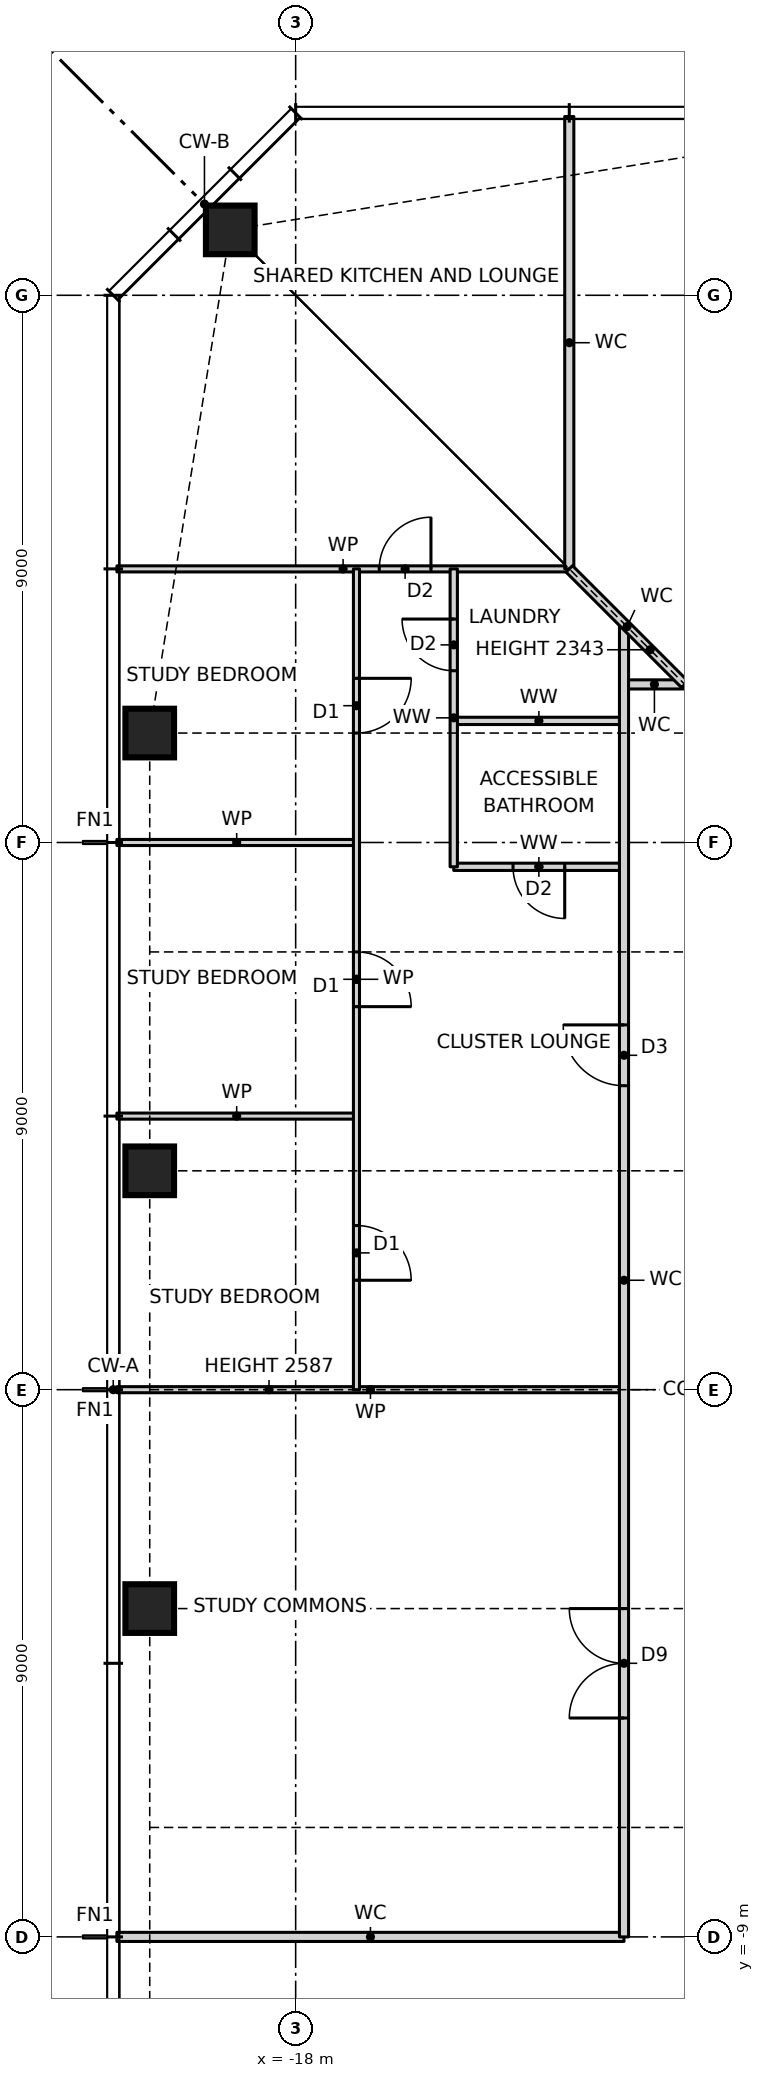
"""IFC4 building model, lengths in metres.
Left out: names, types, materials, properties, quantities, classifications, styles, units other than length and angle.
Written with IfcOpenShell. Run it as: python <this file> out.ifc"""

import sys

from ifc_helpers import new_model, si_unit, direction, frame, frame_2d, origin, origin_2d, place, context, subcontext, project, spatial, rectangle, hollow_rectangle, extrude, element, fill, save


model = new_model("IFC4")
c1 = context("Model", 3, precision=1e-05, world=origin(), true_north=direction((0.0, 1.0)))
c2 = subcontext(c1, "Body", "Model", "MODEL_VIEW")
j1 = project(units=[si_unit("LENGTHUNIT", "METRE"), si_unit("PLANEANGLEUNIT", "RADIAN")], contexts=[c1])
p1 = place(None, origin())
s1 = spatial("IfcSite", under=j1, at=p1, CompositionType="ELEMENT")
p2 = place(p1, origin())
s2 = spatial("IfcBuilding", under=s1, at=p2, CompositionType="ELEMENT")
p3 = place(p2, frame((0.0, 0.0, 126.0)))
s3 = spatial("IfcBuildingStorey", under=s2, at=p3, CompositionType="ELEMENT", Elevation=126.0)
for number, where, z_axis, x_axis in (
    (1, (-19.076, 19.076, 0.0), (0.0, 0.0, 1.0), (1.0, 0.0, 0.0)),
    (2, (-20.4, 10.8, 0.0), (0.0, 0.0, 1.0), (1.0, 0.0, 0.0)),
    (3, (-20.4, 3.6, 0.0), (0.0, 0.0, 1.0), (1.0, 0.0, 0.0)),
    (4, (-20.4, -3.6, 0.0), (0.0, 0.0, 1.0), (1.0, 0.0, 0.0)),
):
    element("IfcColumn", number, at=place(p3, frame(where, z_axis=z_axis, x_axis=x_axis)), inside=s3, PredefinedType="COLUMN", context=c2, shape_type="SweptSolid", body=[
        extrude(hollow_rectangle(XDim=0.8, YDim=0.8, WallThickness=0.07, at=origin_2d()), origin(), (0.0, 0.0, 1.0), 3.5),
    ])
p4 = place(p3, frame((-20.94, -9.0, 0.0), z_axis=(0.0, 0.0, 1.0), x_axis=(1.0, 0.0, 0.0)))
e5 = element("IfcWall", 5, at=p4, inside=s3, PredefinedType="PARTITIONING", context=c2, shape_type="SweptSolid", body=[
    extrude(rectangle(XDim=8.34, YDim=0.15, at=frame_2d((4.17, 0.0))), origin(), (0.0, 0.0, 1.0), 3.27),
])
p5 = place(p3, frame((-20.94, 0.0, 0.0), z_axis=(0.0, 0.0, 1.0), x_axis=(1.0, 0.0, 0.0)))
e6 = element("IfcWall", 6, at=p5, inside=s3, PredefinedType="PARTITIONING", context=c2, shape_type="SweptSolid", body=[
    extrude(rectangle(XDim=8.34, YDim=0.1, at=frame_2d((4.17, 0.0))), origin(), (0.0, 0.0, 1.0), 2.587),
])
p6 = place(p3, frame((-20.94, 4.5, 0.0), z_axis=(0.0, 0.0, 1.0), x_axis=(1.0, 0.0, 0.0)))
e7 = element("IfcWall", 7, at=p6, inside=s3, PredefinedType="PARTITIONING", context=c2, shape_type="SweptSolid", body=[
    extrude(rectangle(XDim=3.94, YDim=0.1, at=frame_2d((1.97, 0.0))), origin(), (0.0, 0.0, 1.0), 3.27),
])
p7 = place(p3, frame((-15.4, 8.6, 0.0), z_axis=(0.0, 0.0, 1.0), x_axis=(1.0, 0.0, 0.0)))
e8 = element("IfcWall", 8, at=p7, inside=s3, PredefinedType="PARTITIONING", context=c2, shape_type="SweptSolid", body=[
    extrude(rectangle(XDim=2.8, YDim=0.12, at=frame_2d((1.4, 0.0))), origin(), (0.0, 0.0, 1.0), 3.27),
])
p8 = place(p7, frame((0.975, 0.0, 0.0)))
e9 = element("IfcOpeningElement", 9, at=p8, cuts=e8, PredefinedType="OPENING", context=c2, shape_type="SweptSolid", body=[
    extrude(rectangle(XDim=0.85, YDim=2.1, at=frame_2d((0.425, 1.05))), frame((0.0, 0.07, 0.0), z_axis=(0.0, -1.0, 0.0), x_axis=(1.0, 0.0, 0.0)), (0.0, 0.0, 1.0), 0.14),
])
p9 = place(p3, frame((-20.94, 9.0, 0.0), z_axis=(0.0, 0.0, 1.0), x_axis=(1.0, 0.0, 0.0)))
e10 = element("IfcWall", 10, at=p9, inside=s3, PredefinedType="PARTITIONING", context=c2, shape_type="SweptSolid", body=[
    extrude(rectangle(XDim=3.94, YDim=0.1, at=frame_2d((1.97, 0.0))), origin(), (0.0, 0.0, 1.0), 3.27),
])
p10 = place(p3, frame((-15.4, 11.0, 0.0), z_axis=(0.0, 0.0, 1.0), x_axis=(1.0, 0.0, 0.0)))
e11 = element("IfcWall", 11, at=p10, inside=s3, PredefinedType="PARTITIONING", context=c2, shape_type="SweptSolid", body=[
    extrude(rectangle(XDim=2.8, YDim=0.12, at=frame_2d((1.4, 0.0))), origin(), (0.0, 0.0, 1.0), 3.27),
])
p11 = place(p3, frame((-12.6, 11.6, 0.0), z_axis=(0.0, 0.0, 1.0), x_axis=(1.0, 0.0, 0.0)))
e12 = element("IfcWall", 12, at=p11, inside=s3, PredefinedType="PARTITIONING", context=c2, shape_type="SweptSolid", body=[
    extrude(rectangle(XDim=1.0, YDim=0.15, at=frame_2d((0.5, 0.0))), origin(), (0.0, 0.0, 1.0), 3.27),
])
p12 = place(p3, frame((-20.94, 13.5, 0.0), z_axis=(0.0, 0.0, 1.0), x_axis=(1.0, 0.0, 0.0)))
e13 = element("IfcWall", 13, at=p12, inside=s3, PredefinedType="PARTITIONING", context=c2, shape_type="SweptSolid", body=[
    extrude(rectangle(XDim=7.44, YDim=0.1, at=frame_2d((3.72, 0.0))), origin(), (0.0, 0.0, 1.0), 3.27),
])
p13 = place(p12, frame((4.315, 0.0, 0.0)))
e14 = element("IfcOpeningElement", 14, at=p13, cuts=e13, PredefinedType="OPENING", context=c2, shape_type="SweptSolid", body=[
    extrude(rectangle(XDim=0.85, YDim=2.1, at=frame_2d((0.425, 1.05))), frame((0.0, 0.06, 0.0), z_axis=(0.0, -1.0, 0.0), x_axis=(1.0, 0.0, 0.0)), (0.0, 0.0, 1.0), 0.12),
])
p14 = place(p3, frame((-12.6, -9.0, 0.0), z_axis=(0.0, 0.0, 1.0), x_axis=(0.0, 1.0, 0.0)))
e15 = element("IfcWall", 15, at=p14, inside=s3, PredefinedType="PARTITIONING", context=c2, shape_type="SweptSolid", body=[
    extrude(rectangle(XDim=21.6, YDim=0.15, at=frame_2d((10.8, 0.0))), origin(), (0.0, 0.0, 1.0), 3.27),
])
p15 = place(p14, frame((14.0, 0.0, 0.0)))
e16 = element("IfcOpeningElement", 16, at=p15, cuts=e15, PredefinedType="OPENING", context=c2, shape_type="SweptSolid", body=[
    extrude(rectangle(XDim=1.0, YDim=2.1, at=frame_2d((0.5, 1.05))), frame((0.0, 0.085, 0.0), z_axis=(0.0, -1.0, 0.0), x_axis=(1.0, 0.0, 0.0)), (0.0, 0.0, 1.0), 0.17),
])
p16 = place(p14, frame((3.6, 0.0, 0.0)))
e17 = element("IfcOpeningElement", 17, at=p16, cuts=e15, PredefinedType="OPENING", context=c2, shape_type="SweptSolid", body=[
    extrude(rectangle(XDim=1.8, YDim=2.1, at=frame_2d((0.9, 1.05))), frame((0.0, 0.085, 0.0), z_axis=(0.0, -1.0, 0.0), x_axis=(1.0, 0.0, 0.0)), (0.0, 0.0, 1.0), 0.17),
])
p17 = place(p3, frame((-13.5, 13.5, 0.0), z_axis=(0.0, 0.0, 1.0), x_axis=(0.0, 1.0, 0.0)))
e18 = element("IfcWall", 18, at=p17, inside=s3, PredefinedType="PARTITIONING", context=c2, shape_type="SweptSolid", body=[
    extrude(rectangle(XDim=7.44, YDim=0.15, at=frame_2d((3.72, 0.0))), origin(), (0.0, 0.0, 1.0), 3.27),
])
p18 = place(p3, frame((-15.4, 8.6, 0.0), z_axis=(0.0, 0.0, 1.0), x_axis=(0.0, 1.0, 0.0)))
e19 = element("IfcWall", 19, at=p18, inside=s3, PredefinedType="PARTITIONING", context=c2, shape_type="SweptSolid", body=[
    extrude(rectangle(XDim=4.9, YDim=0.12, at=frame_2d((2.45, 0.0))), origin(), (0.0, 0.0, 1.0), 3.27),
])
p19 = place(p18, frame((3.225, 0.0, 0.0)))
e20 = element("IfcOpeningElement", 20, at=p19, cuts=e19, PredefinedType="OPENING", context=c2, shape_type="SweptSolid", body=[
    extrude(rectangle(XDim=0.85, YDim=2.1, at=frame_2d((0.425, 1.05))), frame((0.0, 0.07, 0.0), z_axis=(0.0, -1.0, 0.0), x_axis=(1.0, 0.0, 0.0)), (0.0, 0.0, 1.0), 0.14),
])
p20 = place(p3, frame((-17.0, 0.0, 0.0), z_axis=(0.0, 0.0, 1.0), x_axis=(0.0, 1.0, 0.0)))
e21 = element("IfcWall", 21, at=p20, inside=s3, PredefinedType="PARTITIONING", context=c2, shape_type="SweptSolid", body=[
    extrude(rectangle(XDim=13.5, YDim=0.1, at=frame_2d((6.75, 0.0))), origin(), (0.0, 0.0, 1.0), 3.27),
])
p21 = place(p20, frame((10.8, 0.0, 0.0)))
e22 = element("IfcOpeningElement", 22, at=p21, cuts=e21, PredefinedType="OPENING", context=c2, shape_type="SweptSolid", body=[
    extrude(rectangle(XDim=0.9, YDim=2.1, at=frame_2d((0.45, 1.05))), frame((0.0, 0.06, 0.0), z_axis=(0.0, -1.0, 0.0), x_axis=(1.0, 0.0, 0.0)), (0.0, 0.0, 1.0), 0.12),
])
p22 = place(p20, frame((6.3, 0.0, 0.0)))
e23 = element("IfcOpeningElement", 23, at=p22, cuts=e21, PredefinedType="OPENING", context=c2, shape_type="SweptSolid", body=[
    extrude(rectangle(XDim=0.9, YDim=2.1, at=frame_2d((0.45, 1.05))), frame((0.0, 0.06, 0.0), z_axis=(0.0, -1.0, 0.0), x_axis=(1.0, 0.0, 0.0)), (0.0, 0.0, 1.0), 0.12),
])
p23 = place(p20, frame((1.8, 0.0, 0.0)))
e24 = element("IfcOpeningElement", 24, at=p23, cuts=e21, PredefinedType="OPENING", context=c2, shape_type="SweptSolid", body=[
    extrude(rectangle(XDim=0.9, YDim=2.1, at=frame_2d((0.45, 1.05))), frame((0.0, 0.06, 0.0), z_axis=(0.0, -1.0, 0.0), x_axis=(1.0, 0.0, 0.0)), (0.0, 0.0, 1.0), 0.12),
])
p24 = place(p3, frame((-11.6, 11.6, 0.0), z_axis=(0.0, 0.0, 1.0), x_axis=(-0.707106781187, 0.707106781187, 0.0)))
e25 = element("IfcWall", 25, at=p24, inside=s3, PredefinedType="PARTITIONING", context=c2, shape_type="SweptSolid", body=[
    extrude(rectangle(XDim=2.687, YDim=0.15, at=frame_2d((1.343, 0.0))), origin(), (0.0, 0.0, 1.0), 2.343),
])
p25 = place(p21, frame((0.9, 0.0, 0.0), z_axis=(0.0, 0.0, 1.0), x_axis=(-1.0, 0.0, 0.0)))
e26 = element("IfcDoor", 26, at=p25, inside=s3, OperationType="SINGLE_SWING_LEFT", PredefinedType="DOOR", context=c2, shape_type="SweptSolid", body=[
    extrude(rectangle(XDim=0.9, YDim=2.1, at=frame_2d((0.45, 1.05))), frame((0.0, 0.025, 0.0), z_axis=(0.0, -1.0, 0.0), x_axis=(1.0, 0.0, 0.0)), (0.0, 0.0, 1.0), 0.05),
])
fill(e22, e26)
p26 = place(p22, frame((0.9, 0.0, 0.0), z_axis=(0.0, 0.0, 1.0), x_axis=(-1.0, 0.0, 0.0)))
e27 = element("IfcDoor", 27, at=p26, inside=s3, OperationType="SINGLE_SWING_RIGHT", PredefinedType="DOOR", context=c2, shape_type="SweptSolid", body=[
    extrude(rectangle(XDim=0.9, YDim=2.1, at=frame_2d((0.45, 1.05))), frame((0.0, 0.025, 0.0), z_axis=(0.0, -1.0, 0.0), x_axis=(1.0, 0.0, 0.0)), (0.0, 0.0, 1.0), 0.05),
])
fill(e23, e27)
p27 = place(p23, frame((0.9, 0.0, 0.0), z_axis=(0.0, 0.0, 1.0), x_axis=(-1.0, 0.0, 0.0)))
e28 = element("IfcDoor", 28, at=p27, inside=s3, OperationType="SINGLE_SWING_RIGHT", PredefinedType="DOOR", context=c2, shape_type="SweptSolid", body=[
    extrude(rectangle(XDim=0.9, YDim=2.1, at=frame_2d((0.45, 1.05))), frame((0.0, 0.025, 0.0), z_axis=(0.0, -1.0, 0.0), x_axis=(1.0, 0.0, 0.0)), (0.0, 0.0, 1.0), 0.05),
])
fill(e24, e28)
p28 = place(p15, origin())
e29 = element("IfcDoor", 29, at=p28, inside=s3, OperationType="SINGLE_SWING_RIGHT", PredefinedType="DOOR", context=c2, shape_type="SweptSolid", body=[
    extrude(rectangle(XDim=1.0, YDim=2.1, at=frame_2d((0.5, 1.05))), frame((0.0, 0.025, 0.0), z_axis=(0.0, -1.0, 0.0), x_axis=(1.0, 0.0, 0.0)), (0.0, 0.0, 1.0), 0.05),
])
fill(e16, e29)
p29 = place(p19, origin())
e30 = element("IfcDoor", 30, at=p29, inside=s3, OperationType="SINGLE_SWING_RIGHT", PredefinedType="DOOR", context=c2, shape_type="SweptSolid", body=[
    extrude(rectangle(XDim=0.85, YDim=2.1, at=frame_2d((0.425, 1.05))), frame((0.0, 0.025, 0.0), z_axis=(0.0, -1.0, 0.0), x_axis=(1.0, 0.0, 0.0)), (0.0, 0.0, 1.0), 0.05),
])
fill(e20, e30)
p30 = place(p8, frame((0.85, 0.0, 0.0), z_axis=(0.0, 0.0, 1.0), x_axis=(-1.0, 0.0, 0.0)))
e31 = element("IfcDoor", 31, at=p30, inside=s3, OperationType="SINGLE_SWING_LEFT", PredefinedType="DOOR", context=c2, shape_type="SweptSolid", body=[
    extrude(rectangle(XDim=0.85, YDim=2.1, at=frame_2d((0.425, 1.05))), frame((0.0, 0.025, 0.0), z_axis=(0.0, -1.0, 0.0), x_axis=(1.0, 0.0, 0.0)), (0.0, 0.0, 1.0), 0.05),
])
fill(e9, e31)
p31 = place(p16, origin())
e32 = element("IfcDoor", 32, at=p31, inside=s3, OperationType="DOUBLE_DOOR_SINGLE_SWING", PredefinedType="DOOR", context=c2, shape_type="SweptSolid", body=[
    extrude(rectangle(XDim=1.8, YDim=2.1, at=frame_2d((0.9, 1.05))), frame((0.0, 0.025, 0.0), z_axis=(0.0, -1.0, 0.0), x_axis=(1.0, 0.0, 0.0)), (0.0, 0.0, 1.0), 0.05),
])
fill(e17, e32)
p32 = place(p13, origin())
e33 = element("IfcDoor", 33, at=p32, inside=s3, OperationType="SINGLE_SWING_RIGHT", PredefinedType="DOOR", context=c2, shape_type="SweptSolid", body=[
    extrude(rectangle(XDim=0.85, YDim=2.1, at=frame_2d((0.425, 1.05))), frame((0.0, 0.025, 0.0), z_axis=(0.0, -1.0, 0.0), x_axis=(1.0, 0.0, 0.0)), (0.0, 0.0, 1.0), 0.05),
])
fill(e14, e33)
save(model, sys.argv[1])
